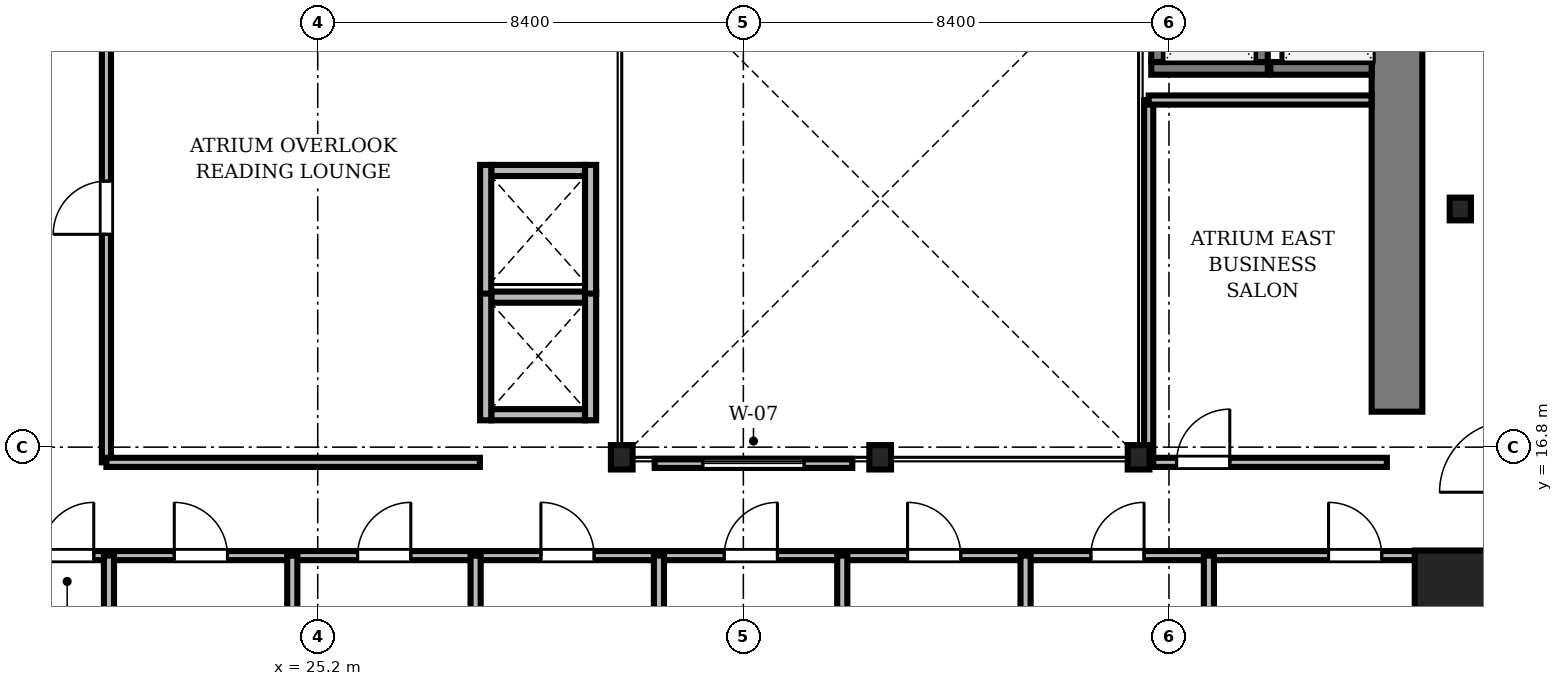
"""IFC4 building model, lengths in metres.
Left out: names, types, materials, properties, quantities, classifications, styles, units other than length and angle.
Written with IfcOpenShell. Run it as: python <this file> out.ifc"""

import sys

from ifc_helpers import new_model, si_unit, direction, frame, frame_2d, origin, origin_2d, place, context, subcontext, project, spatial, rectangle, i_section, extrude, source, transform, mapped, element, fill, save


model = new_model("IFC4")
c1 = context("Model", 3, precision=1e-05, world=origin(), true_north=direction((0.0, 1.0)))
c2 = subcontext(c1, "Body", "Model", "MODEL_VIEW")
j1 = project(units=[si_unit("LENGTHUNIT", "METRE"), si_unit("PLANEANGLEUNIT", "RADIAN")], contexts=[c1])
p1 = place(None, origin())
s1 = spatial("IfcSite", under=j1, at=p1, CompositionType="ELEMENT")
p2 = place(p1, origin())
s2 = spatial("IfcBuilding", under=s1, at=p2, CompositionType="ELEMENT")
p3 = place(p2, frame((0.0, 0.0, 60.45)))
s3 = spatial("IfcBuildingStorey", under=s2, at=p3, CompositionType="ELEMENT", Elevation=60.45)
m1 = source(origin(), c2, "Body", "SweptSolid", [
    extrude(rectangle(XDim=13.15, YDim=1.0, at=frame_2d((6.575, 0.0))), origin(), (0.0, 0.0, 1.0), 3.41),
])
p4 = place(p3, frame((46.5, 17.5, 0.0), z_axis=(0.0, 0.0, 1.0), x_axis=(0.0, 1.0, 0.0)))
e1 = element("IfcWall", 1, at=p4, inside=s3, PredefinedType="SHEAR", context=c2, shape_type="MappedRepresentation", body=[
    mapped(m1, transform((0.0, 0.0, 0.0), scale=1.0)),
])
m2 = source(origin(), c2, "Body", "SweptSolid", [
    extrude(i_section(OverallWidth=0.428, OverallDepth=0.481, WebThickness=0.04, FlangeThickness=0.063, FilletRadius=0.015, at=origin_2d()), origin(), (0.0, 0.0, 1.0), 3.41),
])
for number, where, z_axis, x_axis in (
    (2, (31.2, 16.6, 0.0), (0.0, 0.0, 1.0), (1.0, 0.0, 0.0)),
    (3, (36.3, 16.6, 0.0), (0.0, 0.0, 1.0), (1.0, 0.0, 0.0)),
    (4, (41.4, 16.6, 0.0), (0.0, 0.0, 1.0), (1.0, 0.0, 0.0)),
):
    element("IfcColumn", number, at=place(p3, frame(where, z_axis=z_axis, x_axis=x_axis)), inside=s3, PredefinedType="COLUMN", context=c2, shape_type="MappedRepresentation", body=[
        mapped(m2, transform((0.0, 0.0, 0.0), scale=1.0)),
    ])
m3 = source(origin(), c2, "Body", "SweptSolid", [
    extrude(rectangle(XDim=1.8, YDim=1.8, at=origin_2d()), origin(), (0.0, 0.0, 1.0), 3.41),
])
p5 = place(p3, frame((47.75, 13.86, 0.0), z_axis=(0.0, 0.0, 1.0), x_axis=(1.0, 0.0, 0.0)))
e5 = element("IfcColumn", 5, at=p5, inside=s3, PredefinedType="COLUMN", context=c2, shape_type="MappedRepresentation", body=[
    mapped(m3, transform((0.0, 0.0, 0.0), scale=1.0)),
])
m4 = source(origin(), c2, "Body", "SweptSolid", [
    extrude(i_section(OverallWidth=0.419, OverallDepth=0.449, WebThickness=0.031, FlangeThickness=0.048, FilletRadius=0.015, at=origin_2d()), origin(), (0.0, 0.0, 1.0), 3.41),
])
p6 = place(p3, frame((47.75, 21.5, 0.0), z_axis=(0.0, 0.0, 1.0), x_axis=(1.0, 0.0, 0.0)))
e6 = element("IfcColumn", 6, at=p6, inside=s3, PredefinedType="COLUMN", context=c2, shape_type="MappedRepresentation", body=[
    mapped(m4, transform((0.0, 0.0, 0.0), scale=1.0)),
])
m5 = source(origin(), c2, "Body", "SweptSolid", [
    extrude(rectangle(XDim=1.85, YDim=0.22, at=frame_2d((0.925, 0.0))), origin(), (0.0, 0.0, 1.0), 3.41),
])
for number, where, z_axis, x_axis in (
    (7, (28.625, 17.44, 0.0), (0.0, 0.0, 1.0), (1.0, 0.0, 0.0)),
    (8, (28.625, 19.76, 0.0), (0.0, 0.0, 1.0), (1.0, 0.0, 0.0)),
):
    element("IfcWall", number, at=place(p3, frame(where, z_axis=z_axis, x_axis=x_axis)), inside=s3, PredefinedType="SOLIDWALL", context=c2, shape_type="MappedRepresentation", body=[
        mapped(m5, transform((0.0, 0.0, 0.0), scale=1.0)),
    ])
m6 = source(origin(), c2, "Body", "SweptSolid", [
    extrude(rectangle(XDim=2.54, YDim=0.22, at=frame_2d((1.27, 0.0))), origin(), (0.0, 0.0, 1.0), 3.41),
])
for number, where, z_axis, x_axis in (
    (9, (28.515, 17.33, 0.0), (0.0, 0.0, 1.0), (0.0, 1.0, 0.0)),
    (10, (30.585, 17.33, 0.0), (0.0, 0.0, 1.0), (0.0, 1.0, 0.0)),
):
    element("IfcWall", number, at=place(p3, frame(where, z_axis=z_axis, x_axis=x_axis)), inside=s3, PredefinedType="SOLIDWALL", context=c2, shape_type="MappedRepresentation", body=[
        mapped(m6, transform((0.0, 0.0, 0.0), scale=1.0)),
    ])
p7 = place(p3, frame((28.625, 22.26, 0.0), z_axis=(0.0, 0.0, 1.0), x_axis=(1.0, 0.0, 0.0)))
e11 = element("IfcWall", 11, at=p7, inside=s3, PredefinedType="SOLIDWALL", context=c2, shape_type="MappedRepresentation", body=[
    mapped(m5, transform((0.0, 0.0, 0.0), scale=1.0)),
])
for number, where, z_axis, x_axis in (
    (12, (28.515, 19.83, 0.0), (0.0, 0.0, 1.0), (0.0, 1.0, 0.0)),
    (13, (30.585, 19.83, 0.0), (0.0, 0.0, 1.0), (0.0, 1.0, 0.0)),
):
    element("IfcWall", number, at=place(p3, frame(where, z_axis=z_axis, x_axis=x_axis)), inside=s3, PredefinedType="SOLIDWALL", context=c2, shape_type="MappedRepresentation", body=[
        mapped(m6, transform((0.0, 0.0, 0.0), scale=1.0)),
    ])
m7 = source(origin(), c2, "Body", "SweptSolid", [
    extrude(rectangle(XDim=2.3, YDim=0.25, at=frame_2d((1.15, 0.0))), origin(), (0.0, 0.0, 1.0), 3.41),
])
for number, where, z_axis, x_axis in (
    (14, (41.65, 24.275, 0.0), (0.0, 0.0, 1.0), (1.0, 0.0, 0.0)),
    (15, (41.775, 24.4, 0.0), (0.0, 0.0, 1.0), (0.0, 1.0, 0.0)),
    (16, (43.825, 24.4, 0.0), (0.0, 0.0, 1.0), (0.0, 1.0, 0.0)),
):
    element("IfcWall", number, at=place(p3, frame(where, z_axis=z_axis, x_axis=x_axis)), inside=s3, PredefinedType="SOLIDWALL", context=c2, shape_type="MappedRepresentation", body=[
        mapped(m7, transform((0.0, 0.0, 0.0), scale=1.0)),
    ])
m8 = source(origin(), c2, "Body", "SweptSolid", [
    extrude(rectangle(XDim=2.0, YDim=0.25, at=frame_2d((1.0, 0.0))), origin(), (0.0, 0.0, 1.0), 3.41),
])
p8 = place(p3, frame((44.0, 24.275, 0.0), z_axis=(0.0, 0.0, 1.0), x_axis=(1.0, 0.0, 0.0)))
e17 = element("IfcWall", 17, at=p8, inside=s3, PredefinedType="SOLIDWALL", context=c2, shape_type="MappedRepresentation", body=[
    mapped(m8, transform((0.0, 0.0, 0.0), scale=1.0)),
])
m9 = source(origin(), c2, "Body", "SweptSolid", [
    extrude(rectangle(XDim=46.156, YDim=0.18, at=frame_2d((23.078, 0.0))), origin(), (0.0, 0.0, 1.0), 2.652),
])
p9 = place(p3, frame((2.422, 14.66, 0.0), z_axis=(0.0, 0.0, 1.0), x_axis=(1.0, 0.0, 0.0)))
e18 = element("IfcWall", 18, at=p9, inside=s3, PredefinedType="PARTITIONING", context=c2, shape_type="MappedRepresentation", body=[
    mapped(m9, transform((0.0, 0.0, 0.0), scale=1.0)),
])
m10 = source(origin(), c2, "Body", "SweptSolid", [
    extrude(rectangle(XDim=1.05, YDim=2.2, at=frame_2d((0.525, 1.1))), frame((0.0, 0.1, 0.0), z_axis=(0.0, -1.0, 0.0), x_axis=(1.0, 0.0, 0.0)), (0.0, 0.0, 1.0), 0.2),
])
p10 = place(p9, frame((17.308, 0.0, 0.0)))
e19 = element("IfcOpeningElement", 19, at=p10, cuts=e18, PredefinedType="OPENING", context=c2, shape_type="MappedRepresentation", body=[
    mapped(m10, transform((0.0, 0.0, 0.0), scale=1.0)),
])
p11 = place(p9, frame((19.947, 0.0, 0.0)))
e20 = element("IfcOpeningElement", 20, at=p11, cuts=e18, PredefinedType="OPENING", context=c2, shape_type="MappedRepresentation", body=[
    mapped(m10, transform((0.0, 0.0, 0.0), scale=1.0)),
])
p12 = place(p9, frame((23.565, 0.0, 0.0)))
e21 = element("IfcOpeningElement", 21, at=p12, cuts=e18, PredefinedType="OPENING", context=c2, shape_type="MappedRepresentation", body=[
    mapped(m10, transform((0.0, 0.0, 0.0), scale=1.0)),
])
p13 = place(p9, frame((27.183, 0.0, 0.0)))
e22 = element("IfcOpeningElement", 22, at=p13, cuts=e18, PredefinedType="OPENING", context=c2, shape_type="MappedRepresentation", body=[
    mapped(m10, transform((0.0, 0.0, 0.0), scale=1.0)),
])
p14 = place(p9, frame((30.801, 0.0, 0.0)))
e23 = element("IfcOpeningElement", 23, at=p14, cuts=e18, PredefinedType="OPENING", context=c2, shape_type="MappedRepresentation", body=[
    mapped(m10, transform((0.0, 0.0, 0.0), scale=1.0)),
])
p15 = place(p9, frame((34.419, 0.0, 0.0)))
e24 = element("IfcOpeningElement", 24, at=p15, cuts=e18, PredefinedType="OPENING", context=c2, shape_type="MappedRepresentation", body=[
    mapped(m10, transform((0.0, 0.0, 0.0), scale=1.0)),
])
p16 = place(p9, frame((38.037, 0.0, 0.0)))
e25 = element("IfcOpeningElement", 25, at=p16, cuts=e18, PredefinedType="OPENING", context=c2, shape_type="MappedRepresentation", body=[
    mapped(m10, transform((0.0, 0.0, 0.0), scale=1.0)),
])
p17 = place(p9, frame((42.727, 0.0, 0.0)))
e26 = element("IfcOpeningElement", 26, at=p17, cuts=e18, PredefinedType="OPENING", context=c2, shape_type="MappedRepresentation", body=[
    mapped(m10, transform((0.0, 0.0, 0.0), scale=1.0)),
])
m11 = source(origin(), c2, "Body", "SweptSolid", [
    extrude(rectangle(XDim=11.94, YDim=0.18, at=frame_2d((5.97, 0.0))), origin(), (0.0, 0.0, 1.0), 2.802),
])
p18 = place(p3, frame((21.03, 16.5, 0.0), z_axis=(0.0, 0.0, 1.0), x_axis=(0.0, 1.0, 0.0)))
e27 = element("IfcWall", 27, at=p18, inside=s3, PredefinedType="PARTITIONING", context=c2, shape_type="MappedRepresentation", body=[
    mapped(m11, transform((0.0, 0.0, 0.0), scale=1.0)),
])
p19 = place(p18, frame((4.5, 0.0, 0.0)))
e28 = element("IfcOpeningElement", 28, at=p19, cuts=e27, PredefinedType="OPENING", context=c2, shape_type="MappedRepresentation", body=[
    mapped(m10, transform((0.0, 0.0, 0.0), scale=1.0)),
])
m12 = source(origin(), c2, "Body", "SweptSolid", [
    extrude(rectangle(XDim=4.7, YDim=0.18, at=frame_2d((2.35, 0.0))), origin(), (0.0, 0.0, 1.0), 2.802),
])
p20 = place(p3, frame((41.6, 16.5, 0.0), z_axis=(0.0, 0.0, 1.0), x_axis=(1.0, 0.0, 0.0)))
e29 = element("IfcWall", 29, at=p20, inside=s3, PredefinedType="PARTITIONING", context=c2, shape_type="MappedRepresentation", body=[
    mapped(m12, transform((0.0, 0.0, 0.0), scale=1.0)),
])
p21 = place(p20, frame((0.55, 0.0, 0.0)))
e30 = element("IfcOpeningElement", 30, at=p21, cuts=e29, PredefinedType="OPENING", context=c2, shape_type="MappedRepresentation", body=[
    mapped(m10, transform((0.0, 0.0, 0.0), scale=1.0)),
])
m13 = source(origin(), c2, "Body", "SweptSolid", [
    extrude(rectangle(XDim=12.538, YDim=0.2, at=frame_2d((6.269, 0.0))), origin(), (0.0, 0.0, 1.0), 2.652),
])
p22 = place(p3, frame((21.08, 2.122, 0.0), z_axis=(0.0, 0.0, 1.0), x_axis=(0.0, 1.0, 0.0)))
e31 = element("IfcWall", 31, at=p22, inside=s3, PredefinedType="PARTITIONING", context=c2, shape_type="MappedRepresentation", body=[
    mapped(m13, transform((0.0, 0.0, 0.0), scale=1.0)),
])
m14 = source(origin(), c2, "Body", "SweptSolid", [
    extrude(rectangle(XDim=12.73, YDim=0.2, at=frame_2d((6.365, 0.0))), origin(), (0.0, 0.0, 1.0), 2.652),
])
for number, where, z_axis, x_axis in (
    (32, (24.698, 1.93, 0.0), (0.0, 0.0, 1.0), (0.0, 1.0, 0.0)),
    (33, (28.316, 1.93, 0.0), (0.0, 0.0, 1.0), (0.0, 1.0, 0.0)),
):
    element("IfcWall", number, at=place(p3, frame(where, z_axis=z_axis, x_axis=x_axis)), inside=s3, PredefinedType="PARTITIONING", context=c2, shape_type="MappedRepresentation", body=[
        mapped(m14, transform((0.0, 0.0, 0.0), scale=1.0)),
    ])
for number, where, z_axis, x_axis in (
    (34, (31.934, 2.122, 0.0), (0.0, 0.0, 1.0), (0.0, 1.0, 0.0)),
    (35, (35.552, 2.122, 0.0), (0.0, 0.0, 1.0), (0.0, 1.0, 0.0)),
    (36, (39.17, 2.122, 0.0), (0.0, 0.0, 1.0), (0.0, 1.0, 0.0)),
    (37, (42.788, 2.122, 0.0), (0.0, 0.0, 1.0), (0.0, 1.0, 0.0)),
):
    element("IfcWall", number, at=place(p3, frame(where, z_axis=z_axis, x_axis=x_axis)), inside=s3, PredefinedType="PARTITIONING", context=c2, shape_type="MappedRepresentation", body=[
        mapped(m13, transform((0.0, 0.0, 0.0), scale=1.0)),
    ])
m15 = source(origin(), c2, "Body", "SweptSolid", [
    extrude(rectangle(XDim=7.37, YDim=0.18, at=frame_2d((3.685, 0.0))), origin(), (0.0, 0.0, 1.0), 2.802),
])
p23 = place(p3, frame((21.03, 16.5, 0.0), z_axis=(0.0, 0.0, 1.0), x_axis=(1.0, 0.0, 0.0)))
e38 = element("IfcWall", 38, at=p23, inside=s3, PredefinedType="PARTITIONING", context=c2, shape_type="MappedRepresentation", body=[
    mapped(m15, transform((0.0, 0.0, 0.0), scale=1.0)),
])
m16 = source(origin(), c2, "Body", "SweptSolid", [
    extrude(rectangle(XDim=7.15, YDim=0.18, at=frame_2d((3.575, 0.0))), origin(), (0.0, 0.0, 1.0), 2.802),
])
p24 = place(p3, frame((41.6, 16.5, 0.0), z_axis=(0.0, 0.0, 1.0), x_axis=(0.0, 1.0, 0.0)))
e39 = element("IfcWall", 39, at=p24, inside=s3, PredefinedType="PARTITIONING", context=c2, shape_type="MappedRepresentation", body=[
    mapped(m16, transform((0.0, 0.0, 0.0), scale=1.0)),
])
m17 = source(origin(), c2, "Body", "SweptSolid", [
    extrude(rectangle(XDim=4.398, YDim=0.18, at=frame_2d((2.199, 0.0))), origin(), (0.0, 0.0, 1.0), 3.41),
])
p25 = place(p3, frame((41.6, 23.65, 0.0), z_axis=(0.0, 0.0, 1.0), x_axis=(1.0, 0.0, 0.0)))
e40 = element("IfcWall", 40, at=p25, inside=s3, PredefinedType="PARTITIONING", context=c2, shape_type="MappedRepresentation", body=[
    mapped(m17, transform((0.0, 0.0, 0.0), scale=1.0)),
])
m18 = source(origin(), c2, "Body", "SweptSolid", [
    extrude(rectangle(XDim=3.9, YDim=0.18, at=frame_2d((1.95, 0.0))), origin(), (0.0, 0.0, 1.0), 2.952),
])
p26 = place(p3, frame((31.85, 16.48, 0.0), z_axis=(0.0, 0.0, 1.0), x_axis=(1.0, 0.0, 0.0)))
e41 = element("IfcWall", 41, at=p26, inside=s3, PredefinedType="PARTITIONING", context=c2, shape_type="MappedRepresentation", body=[
    mapped(m18, transform((0.0, 0.0, 0.0), scale=1.0)),
])
m19 = source(origin(), c2, "Body", "SweptSolid", [
    extrude(rectangle(XDim=2.0, YDim=1.9, at=frame_2d((1.0, 0.95))), frame((0.0, 0.1, 0.0), z_axis=(0.0, -1.0, 0.0), x_axis=(1.0, 0.0, 0.0)), (0.0, 0.0, 1.0), 0.2),
])
p27 = place(p26, frame((0.95, 0.0, 0.55)))
e42 = element("IfcOpeningElement", 42, at=p27, cuts=e41, PredefinedType="OPENING", context=c2, shape_type="MappedRepresentation", body=[
    mapped(m19, transform((0.0, 0.0, 0.0), scale=1.0)),
])
m20 = source(origin(), c2, "Body", "SweptSolid", [
    extrude(rectangle(XDim=1.05, YDim=2.2, at=frame_2d((0.525, 1.1))), frame((0.0, 0.025, 0.0), z_axis=(0.0, -1.0, 0.0), x_axis=(1.0, 0.0, 0.0)), (0.0, 0.0, 1.0), 0.05),
])
p28 = place(p10, origin())
e43 = element("IfcDoor", 43, at=p28, inside=s3, OperationType="SINGLE_SWING_RIGHT", PredefinedType="DOOR", context=c2, shape_type="MappedRepresentation", body=[
    mapped(m20, transform((0.0, 0.0, 0.0), scale=1.0)),
])
fill(e19, e43)
p29 = place(p11, origin())
e44 = element("IfcDoor", 44, at=p29, inside=s3, OperationType="SINGLE_SWING_LEFT", PredefinedType="DOOR", context=c2, shape_type="MappedRepresentation", body=[
    mapped(m20, transform((0.0, 0.0, 0.0), scale=1.0)),
])
fill(e20, e44)
p30 = place(p12, origin())
e45 = element("IfcDoor", 45, at=p30, inside=s3, OperationType="SINGLE_SWING_RIGHT", PredefinedType="DOOR", context=c2, shape_type="MappedRepresentation", body=[
    mapped(m20, transform((0.0, 0.0, 0.0), scale=1.0)),
])
fill(e21, e45)
p31 = place(p13, origin())
e46 = element("IfcDoor", 46, at=p31, inside=s3, OperationType="SINGLE_SWING_LEFT", PredefinedType="DOOR", context=c2, shape_type="MappedRepresentation", body=[
    mapped(m20, transform((0.0, 0.0, 0.0), scale=1.0)),
])
fill(e22, e46)
p32 = place(p14, origin())
e47 = element("IfcDoor", 47, at=p32, inside=s3, OperationType="SINGLE_SWING_RIGHT", PredefinedType="DOOR", context=c2, shape_type="MappedRepresentation", body=[
    mapped(m20, transform((0.0, 0.0, 0.0), scale=1.0)),
])
fill(e23, e47)
p33 = place(p15, origin())
e48 = element("IfcDoor", 48, at=p33, inside=s3, OperationType="SINGLE_SWING_LEFT", PredefinedType="DOOR", context=c2, shape_type="MappedRepresentation", body=[
    mapped(m20, transform((0.0, 0.0, 0.0), scale=1.0)),
])
fill(e24, e48)
p34 = place(p16, origin())
e49 = element("IfcDoor", 49, at=p34, inside=s3, OperationType="SINGLE_SWING_RIGHT", PredefinedType="DOOR", context=c2, shape_type="MappedRepresentation", body=[
    mapped(m20, transform((0.0, 0.0, 0.0), scale=1.0)),
])
fill(e25, e49)
p35 = place(p17, origin())
e50 = element("IfcDoor", 50, at=p35, inside=s3, OperationType="SINGLE_SWING_LEFT", PredefinedType="DOOR", context=c2, shape_type="MappedRepresentation", body=[
    mapped(m20, transform((0.0, 0.0, 0.0), scale=1.0)),
])
fill(e26, e50)
p36 = place(p19, origin())
e51 = element("IfcDoor", 51, at=p36, inside=s3, OperationType="SINGLE_SWING_LEFT", PredefinedType="DOOR", context=c2, shape_type="MappedRepresentation", body=[
    mapped(m20, transform((0.0, 0.0, 0.0), scale=1.0)),
])
fill(e28, e51)
p37 = place(p21, origin())
e52 = element("IfcDoor", 52, at=p37, inside=s3, OperationType="SINGLE_SWING_RIGHT", PredefinedType="DOOR", context=c2, shape_type="MappedRepresentation", body=[
    mapped(m20, transform((0.0, 0.0, 0.0), scale=1.0)),
])
fill(e30, e52)
m21 = source(origin(), c2, "Body", "SweptSolid", [
    extrude(rectangle(XDim=2.0, YDim=1.9, at=frame_2d((1.0, 0.95))), frame((0.0, 0.03, 0.0), z_axis=(0.0, -1.0, 0.0), x_axis=(1.0, 0.0, 0.0)), (0.0, 0.0, 1.0), 0.06),
])
p38 = place(p27, origin())
e53 = element("IfcWindow", 53, at=p38, inside=s3, PartitioningType="SINGLE_PANEL", PredefinedType="WINDOW", context=c2, shape_type="MappedRepresentation", body=[
    mapped(m21, transform((0.0, 0.0, 0.0), scale=1.0)),
])
fill(e42, e53)
save(model, sys.argv[1])
